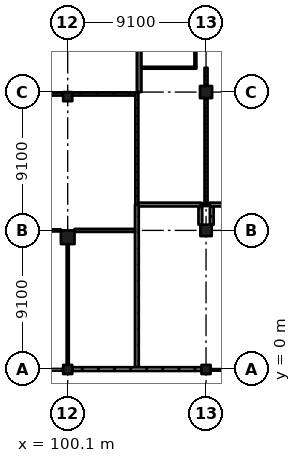
"""IFC4 building model, lengths in metres.
Left out: names, types, materials, properties, quantities, classifications, styles, units other than length and angle.
Written with IfcOpenShell. Run it as: python <this file> out.ifc"""

import sys

from ifc_helpers import new_model, si_unit, direction, frame, frame_2d, origin, origin_2d, place, context, subcontext, project, spatial, rectangle, extrude, element, fill, save


model = new_model("IFC4")
c1 = context("Model", 3, precision=1e-05, world=origin(), true_north=direction((0.0, 1.0)))
c2 = subcontext(c1, "Body", "Model", "MODEL_VIEW")
j1 = project(units=[si_unit("LENGTHUNIT", "METRE"), si_unit("PLANEANGLEUNIT", "RADIAN")], contexts=[c1])
p1 = place(None, origin())
s1 = spatial("IfcSite", under=j1, at=p1, CompositionType="ELEMENT")
p2 = place(p1, origin())
s2 = spatial("IfcBuilding", under=s1, at=p2, CompositionType="ELEMENT")
p3 = place(p2, frame((0.0, 0.0, 10.92)))
s3 = spatial("IfcBuildingStorey", under=s2, at=p3, CompositionType="ELEMENT", Elevation=10.92)
p4 = place(p3, frame((100.1, -0.05, 0.0), z_axis=(0.0, 0.0, 1.0), x_axis=(1.0, 0.0, 0.0)))
e1 = element("IfcColumn", 1, at=p4, inside=s3, PredefinedType="COLUMN", context=c2, shape_type="SweptSolid", body=[
    extrude(rectangle(XDim=0.6, YDim=0.6, at=origin_2d()), origin(), (0.0, 0.0, 1.0), 4.55),
])
p5 = place(p3, frame((100.1, 8.65, 0.0), z_axis=(0.0, 0.0, 1.0), x_axis=(1.0, 0.0, 0.0)))
e2 = element("IfcColumn", 2, at=p5, inside=s3, PredefinedType="COLUMN", context=c2, shape_type="SweptSolid", body=[
    extrude(rectangle(XDim=0.9, YDim=0.9, at=origin_2d()), origin(), (0.0, 0.0, 1.0), 4.55),
])
for number, where, z_axis, x_axis in (
    (3, (100.1, 17.9, 0.0), (0.0, 0.0, 1.0), (1.0, 0.0, 0.0)),
    (4, (109.2, -0.05, 0.0), (0.0, 0.0, 1.0), (1.0, 0.0, 0.0)),
):
    element("IfcColumn", number, at=place(p3, frame(where, z_axis=z_axis, x_axis=x_axis)), inside=s3, PredefinedType="COLUMN", context=c2, shape_type="SweptSolid", body=[
        extrude(rectangle(XDim=0.6, YDim=0.6, at=origin_2d()), origin(), (0.0, 0.0, 1.0), 4.55),
    ])
p6 = place(p3, frame((109.2, 9.1, 0.0), z_axis=(0.0, 0.0, 1.0), x_axis=(1.0, 0.0, 0.0)))
e5 = element("IfcColumn", 5, at=p6, inside=s3, PredefinedType="COLUMN", context=c2, shape_type="SweptSolid", body=[
    extrude(rectangle(XDim=0.75, YDim=0.75, at=origin_2d()), origin(), (0.0, 0.0, 1.0), 4.55),
])
p7 = place(p3, frame((109.2, 18.2, 0.0), z_axis=(0.0, 0.0, 1.0), x_axis=(1.0, 0.0, 0.0)))
e6 = element("IfcColumn", 6, at=p7, inside=s3, PredefinedType="COLUMN", context=c2, shape_type="SweptSolid", body=[
    extrude(rectangle(XDim=0.8, YDim=0.8, at=origin_2d()), origin(), (0.0, 0.0, 1.0), 4.55),
])
p8 = place(p3, frame((104.8, 40.95, 0.0), z_axis=(0.0, 0.0, 1.0), x_axis=(0.0, -1.0, 0.0)))
e7 = element("IfcWall", 7, at=p8, inside=s3, PredefinedType="SHEAR", context=c2, shape_type="SweptSolid", body=[
    extrude(rectangle(XDim=22.75, YDim=0.3, at=frame_2d((11.375, 0.0))), origin(), (0.0, 0.0, 1.0), 4.55),
])
p9 = place(p3, frame((100.4, -0.025, 0.0), z_axis=(0.0, 0.0, 1.0), x_axis=(1.0, 0.0, 0.0)))
e8 = element("IfcWall", 8, at=p9, inside=s3, PredefinedType="SOLIDWALL", context=c2, shape_type="SweptSolid", body=[
    extrude(rectangle(XDim=8.5, YDim=0.25, at=frame_2d((4.25, 0.0))), origin(), (0.0, 0.0, 1.0), 3.5),
])
p10 = place(p3, frame((99.65, 9.1, 0.0), z_axis=(0.0, 0.0, 1.0), x_axis=(-1.0, 0.0, 0.0)))
e9 = element("IfcWall", 9, at=p10, inside=s3, PredefinedType="SOLIDWALL", context=c2, shape_type="SweptSolid", body=[
    extrude(rectangle(XDim=8.2, YDim=0.14, at=frame_2d((4.1, 0.0))), origin(), (0.0, 0.0, 1.0), 3.55),
])
p11 = place(p10, frame((3.35, 0.0, 0.0)))
e10 = element("IfcOpeningElement", 10, at=p11, cuts=e9, PredefinedType="OPENING", context=c2, shape_type="SweptSolid", body=[
    extrude(rectangle(XDim=1.5, YDim=2.1, at=frame_2d((0.75, 1.05))), frame((0.0, 0.08, 0.0), z_axis=(0.0, -1.0, 0.0), x_axis=(1.0, 0.0, 0.0)), (0.0, 0.0, 1.0), 0.16),
])
p12 = place(p3, frame((100.1, 8.2, 0.0), z_axis=(0.0, 0.0, 1.0), x_axis=(0.0, -1.0, 0.0)))
e11 = element("IfcWall", 11, at=p12, inside=s3, PredefinedType="SOLIDWALL", context=c2, shape_type="SweptSolid", body=[
    extrude(rectangle(XDim=7.95, YDim=0.14, at=frame_2d((3.975, 0.0))), origin(), (0.0, 0.0, 1.0), 3.55),
])
p13 = place(p3, frame((104.525, 9.1, 0.0), z_axis=(0.0, 0.0, 1.0), x_axis=(-1.0, 0.0, 0.0)))
e12 = element("IfcWall", 12, at=p13, inside=s3, PredefinedType="PARTITIONING", context=c2, shape_type="SweptSolid", body=[
    extrude(rectangle(XDim=3.975, YDim=0.2, at=frame_2d((1.987, 0.0))), origin(), (0.0, 0.0, 1.0), 3.55),
])
p14 = place(p13, frame((1.45, 0.0, 0.0)))
e13 = element("IfcOpeningElement", 13, at=p14, cuts=e12, PredefinedType="OPENING", context=c2, shape_type="SweptSolid", body=[
    extrude(rectangle(XDim=1.0, YDim=2.1, at=frame_2d((0.5, 1.05))), frame((0.0, 0.11, 0.0), z_axis=(0.0, -1.0, 0.0), x_axis=(1.0, 0.0, 0.0)), (0.0, 0.0, 1.0), 0.22),
])
p15 = place(p3, frame((104.65, 0.1, 0.0), z_axis=(0.0, 0.0, 1.0), x_axis=(0.0, 1.0, 0.0)))
e14 = element("IfcWall", 14, at=p15, inside=s3, PredefinedType="SOLIDWALL", context=c2, shape_type="SweptSolid", body=[
    extrude(rectangle(XDim=10.7, YDim=0.25, at=frame_2d((5.35, 0.0))), origin(), (0.0, 0.0, 1.0), 4.25),
])
p16 = place(p3, frame((104.65, 10.8, 0.0), z_axis=(0.0, 0.0, 1.0), x_axis=(0.0, 1.0, 0.0)))
e15 = element("IfcWall", 15, at=p16, inside=s3, PredefinedType="PARTITIONING", context=c2, shape_type="SweptSolid", body=[
    extrude(rectangle(XDim=7.37, YDim=0.2, at=frame_2d((3.685, 0.0))), origin(), (0.0, 0.0, 1.0), 4.25),
])
p17 = place(p16, frame((0.95, 0.0, 0.0)))
e16 = element("IfcOpeningElement", 16, at=p17, cuts=e15, PredefinedType="OPENING", context=c2, shape_type="SweptSolid", body=[
    extrude(rectangle(XDim=1.8, YDim=2.4, at=frame_2d((0.9, 1.2))), frame((0.0, 0.11, 0.0), z_axis=(0.0, -1.0, 0.0), x_axis=(1.0, 0.0, 0.0)), (0.0, 0.0, 1.0), 0.22),
])
p18 = place(p16, frame((4.65, 0.0, 0.0)))
e17 = element("IfcOpeningElement", 17, at=p18, cuts=e15, PredefinedType="OPENING", context=c2, shape_type="SweptSolid", body=[
    extrude(rectangle(XDim=1.8, YDim=2.4, at=frame_2d((0.9, 1.2))), frame((0.0, 0.11, 0.0), z_axis=(0.0, -1.0, 0.0), x_axis=(1.0, 0.0, 0.0)), (0.0, 0.0, 1.0), 0.22),
])
p19 = place(p3, frame((104.95, 19.8, 0.0), z_axis=(0.0, 0.0, 1.0), x_axis=(1.0, 0.0, 0.0)))
e18 = element("IfcWall", 18, at=p19, inside=s3, PredefinedType="PARTITIONING", context=c2, shape_type="SweptSolid", body=[
    extrude(rectangle(XDim=3.613, YDim=0.125, at=frame_2d((1.806, 0.0))), origin(), (0.0, 0.0, 1.0), 4.25),
])
p20 = place(p19, frame((1.35, 0.0, 0.0)))
e19 = element("IfcOpeningElement", 19, at=p20, cuts=e18, PredefinedType="OPENING", context=c2, shape_type="SweptSolid", body=[
    extrude(rectangle(XDim=0.9, YDim=2.1, at=frame_2d((0.45, 1.05))), frame((0.0, 0.073, 0.0), z_axis=(0.0, -1.0, 0.0), x_axis=(1.0, 0.0, 0.0)), (0.0, 0.0, 1.0), 0.145),
])
p21 = place(p3, frame((108.5, 19.863, 0.0), z_axis=(0.0, 0.0, 1.0), x_axis=(0.0, 1.0, 0.0)))
e20 = element("IfcWall", 20, at=p21, inside=s3, PredefinedType="PARTITIONING", context=c2, shape_type="SweptSolid", body=[
    extrude(rectangle(XDim=7.0, YDim=0.125, at=frame_2d((3.5, 0.0))), origin(), (0.0, 0.0, 1.0), 4.25),
])
p22 = place(p3, frame((108.825, 9.475, 0.0), z_axis=(0.0, 0.0, 1.0), x_axis=(0.0, 1.0, 0.0)))
e21 = element("IfcWall", 21, at=p22, inside=s3, PredefinedType="SOLIDWALL", context=c2, shape_type="SweptSolid", body=[
    extrude(rectangle(XDim=1.2, YDim=0.25, at=frame_2d((0.6, 0.0))), origin(), (0.0, 0.0, 1.0), 4.25),
])
p23 = place(p3, frame((108.825, 10.8, 0.0), z_axis=(0.0, 0.0, 1.0), x_axis=(-1.0, 0.0, 0.0)))
e22 = element("IfcWall", 22, at=p23, inside=s3, PredefinedType="SOLIDWALL", context=c2, shape_type="SweptSolid", body=[
    extrude(rectangle(XDim=4.05, YDim=0.25, at=frame_2d((2.025, 0.0))), origin(), (0.0, 0.0, 1.0), 4.25),
])
p24 = place(p23, frame((1.15, 0.0, 0.0)))
e23 = element("IfcOpeningElement", 23, at=p24, cuts=e22, PredefinedType="OPENING", context=c2, shape_type="SweptSolid", body=[
    extrude(rectangle(XDim=1.8, YDim=2.1, at=frame_2d((0.9, 1.05))), frame((0.0, 0.135, 0.0), z_axis=(0.0, -1.0, 0.0), x_axis=(1.0, 0.0, 0.0)), (0.0, 0.0, 1.0), 0.27),
])
p25 = place(p3, frame((108.825, 10.8, 0.0), z_axis=(0.0, 0.0, 1.0), x_axis=(1.0, 0.0, 0.0)))
e24 = element("IfcWall", 24, at=p25, inside=s3, PredefinedType="PARTITIONING", context=c2, shape_type="SweptSolid", body=[
    extrude(rectangle(XDim=0.475, YDim=0.2, at=frame_2d((0.238, 0.0))), origin(), (0.0, 0.0, 1.0), 4.25),
])
p26 = place(p3, frame((109.2, 10.9, 0.0), z_axis=(0.0, 0.0, 1.0), x_axis=(0.0, 1.0, 0.0)))
e25 = element("IfcWall", 25, at=p26, inside=s3, PredefinedType="PARTITIONING", context=c2, shape_type="SweptSolid", body=[
    extrude(rectangle(XDim=6.9, YDim=0.2, at=frame_2d((3.45, 0.0))), origin(), (0.0, 0.0, 1.0), 3.55),
])
p27 = place(p26, frame((0.85, 0.0, 0.0)))
e26 = element("IfcOpeningElement", 26, at=p27, cuts=e25, PredefinedType="OPENING", context=c2, shape_type="SweptSolid", body=[
    extrude(rectangle(XDim=1.8, YDim=2.4, at=frame_2d((0.9, 1.2))), frame((0.0, 0.11, 0.0), z_axis=(0.0, -1.0, 0.0), x_axis=(1.0, 0.0, 0.0)), (0.0, 0.0, 1.0), 0.22),
])
p28 = place(p26, frame((4.25, 0.0, 0.0)))
e27 = element("IfcOpeningElement", 27, at=p28, cuts=e25, PredefinedType="OPENING", context=c2, shape_type="SweptSolid", body=[
    extrude(rectangle(XDim=1.8, YDim=2.4, at=frame_2d((0.9, 1.2))), frame((0.0, 0.11, 0.0), z_axis=(0.0, -1.0, 0.0), x_axis=(1.0, 0.0, 0.0)), (0.0, 0.0, 1.0), 0.22),
])
p29 = place(p3, frame((109.2, 18.6, 0.0), z_axis=(0.0, 0.0, 1.0), x_axis=(0.0, 1.0, 0.0)))
e28 = element("IfcWall", 28, at=p29, inside=s3, PredefinedType="PARTITIONING", context=c2, shape_type="SweptSolid", body=[
    extrude(rectangle(XDim=1.2, YDim=0.2, at=frame_2d((0.6, 0.0))), origin(), (0.0, 0.0, 1.0), 3.55),
])
p30 = place(p3, frame((109.575, 10.675, 0.0), z_axis=(0.0, 0.0, 1.0), x_axis=(0.0, -1.0, 0.0)))
e29 = element("IfcWall", 29, at=p30, inside=s3, PredefinedType="SOLIDWALL", context=c2, shape_type="SweptSolid", body=[
    extrude(rectangle(XDim=1.2, YDim=0.25, at=frame_2d((0.6, 0.0))), origin(), (0.0, 0.0, 1.0), 4.25),
])
p31 = place(p3, frame((112.17, 10.8, 0.0), z_axis=(0.0, 0.0, 1.0), x_axis=(-1.0, 0.0, 0.0)))
e30 = element("IfcWall", 30, at=p31, inside=s3, PredefinedType="SOLIDWALL", context=c2, shape_type="SweptSolid", body=[
    extrude(rectangle(XDim=2.72, YDim=0.25, at=frame_2d((1.36, 0.0))), origin(), (0.0, 0.0, 1.0), 4.25),
])
p32 = place(p3, frame((91.3, 18.07, 0.0), z_axis=(0.0, 0.0, 1.0), x_axis=(1.0, 0.0, 0.0)))
e31 = element("IfcWall", 31, at=p32, inside=s3, PredefinedType="PARTITIONING", context=c2, shape_type="SweptSolid", body=[
    extrude(rectangle(XDim=8.5, YDim=0.2, at=frame_2d((4.25, 0.0))), origin(), (0.0, 0.0, 1.0), 3.5),
])
p33 = place(p32, frame((1.25, 0.0, 1.1)))
e32 = element("IfcOpeningElement", 32, at=p33, cuts=e31, PredefinedType="OPENING", context=c2, shape_type="SweptSolid", body=[
    extrude(rectangle(XDim=6.0, YDim=2.0, at=frame_2d((3.0, 1.0))), frame((0.0, 0.11, 0.0), z_axis=(0.0, -1.0, 0.0), x_axis=(1.0, 0.0, 0.0)), (0.0, 0.0, 1.0), 0.22),
])
p34 = place(p3, frame((100.4, 18.07, 0.0), z_axis=(0.0, 0.0, 1.0), x_axis=(1.0, 0.0, 0.0)))
e33 = element("IfcWall", 33, at=p34, inside=s3, PredefinedType="PARTITIONING", context=c2, shape_type="SweptSolid", body=[
    extrude(rectangle(XDim=4.15, YDim=0.2, at=frame_2d((2.075, 0.0))), origin(), (0.0, 0.0, 1.0), 3.55),
])
p35 = place(p34, frame((1.075, 0.0, 1.1)))
e34 = element("IfcOpeningElement", 34, at=p35, cuts=e33, PredefinedType="OPENING", context=c2, shape_type="SweptSolid", body=[
    extrude(rectangle(XDim=2.0, YDim=2.0, at=frame_2d((1.0, 1.0))), frame((0.0, 0.11, 0.0), z_axis=(0.0, -1.0, 0.0), x_axis=(1.0, 0.0, 0.0)), (0.0, 0.0, 1.0), 0.22),
])
p36 = place(p35, origin())
e35 = element("IfcWindow", 35, at=p36, inside=s3, PartitioningType="SINGLE_PANEL", PredefinedType="WINDOW", context=c2, shape_type="SweptSolid", body=[
    extrude(rectangle(XDim=2.0, YDim=2.0, at=frame_2d((1.0, 1.0))), frame((0.0, 0.03, 0.0), z_axis=(0.0, -1.0, 0.0), x_axis=(1.0, 0.0, 0.0)), (0.0, 0.0, 1.0), 0.06),
])
fill(e34, e35)
p37 = place(p20, origin())
e36 = element("IfcDoor", 36, at=p37, inside=s3, OperationType="SINGLE_SWING_RIGHT", PredefinedType="DOOR", context=c2, shape_type="SweptSolid", body=[
    extrude(rectangle(XDim=0.9, YDim=2.1, at=frame_2d((0.45, 1.05))), frame((0.0, 0.025, 0.0), z_axis=(0.0, -1.0, 0.0), x_axis=(1.0, 0.0, 0.0)), (0.0, 0.0, 1.0), 0.05),
])
fill(e19, e36)
p38 = place(p24, origin())
e37 = element("IfcDoor", 37, at=p38, inside=s3, OperationType="DOUBLE_DOOR_SINGLE_SWING", PredefinedType="DOOR", context=c2, shape_type="SweptSolid", body=[
    extrude(rectangle(XDim=1.8, YDim=2.1, at=frame_2d((0.9, 1.05))), frame((0.0, 0.025, 0.0), z_axis=(0.0, -1.0, 0.0), x_axis=(1.0, 0.0, 0.0)), (0.0, 0.0, 1.0), 0.05),
])
fill(e23, e37)
p39 = place(p14, origin())
e38 = element("IfcDoor", 38, at=p39, inside=s3, OperationType="SINGLE_SWING_RIGHT", PredefinedType="DOOR", context=c2, shape_type="SweptSolid", body=[
    extrude(rectangle(XDim=1.0, YDim=2.1, at=frame_2d((0.5, 1.05))), frame((0.0, 0.025, 0.0), z_axis=(0.0, -1.0, 0.0), x_axis=(1.0, 0.0, 0.0)), (0.0, 0.0, 1.0), 0.05),
])
fill(e13, e38)
p40 = place(p27, origin())
e39 = element("IfcDoor", 39, at=p40, inside=s3, OperationType="DOUBLE_DOOR_SINGLE_SWING", PredefinedType="DOOR", context=c2, shape_type="SweptSolid", body=[
    extrude(rectangle(XDim=1.8, YDim=2.4, at=frame_2d((0.9, 1.2))), frame((0.0, 0.025, 0.0), z_axis=(0.0, -1.0, 0.0), x_axis=(1.0, 0.0, 0.0)), (0.0, 0.0, 1.0), 0.05),
])
fill(e26, e39)
p41 = place(p28, origin())
e40 = element("IfcDoor", 40, at=p41, inside=s3, OperationType="DOUBLE_DOOR_SINGLE_SWING", PredefinedType="DOOR", context=c2, shape_type="SweptSolid", body=[
    extrude(rectangle(XDim=1.8, YDim=2.4, at=frame_2d((0.9, 1.2))), frame((0.0, 0.025, 0.0), z_axis=(0.0, -1.0, 0.0), x_axis=(1.0, 0.0, 0.0)), (0.0, 0.0, 1.0), 0.05),
])
fill(e27, e40)
p42 = place(p17, origin())
e41 = element("IfcDoor", 41, at=p42, inside=s3, OperationType="DOUBLE_DOOR_SINGLE_SWING", PredefinedType="DOOR", context=c2, shape_type="SweptSolid", body=[
    extrude(rectangle(XDim=1.8, YDim=2.4, at=frame_2d((0.9, 1.2))), frame((0.0, 0.025, 0.0), z_axis=(0.0, -1.0, 0.0), x_axis=(1.0, 0.0, 0.0)), (0.0, 0.0, 1.0), 0.05),
])
fill(e16, e41)
p43 = place(p18, origin())
e42 = element("IfcDoor", 42, at=p43, inside=s3, OperationType="DOUBLE_DOOR_SINGLE_SWING", PredefinedType="DOOR", context=c2, shape_type="SweptSolid", body=[
    extrude(rectangle(XDim=1.8, YDim=2.4, at=frame_2d((0.9, 1.2))), frame((0.0, 0.025, 0.0), z_axis=(0.0, -1.0, 0.0), x_axis=(1.0, 0.0, 0.0)), (0.0, 0.0, 1.0), 0.05),
])
fill(e17, e42)
save(model, sys.argv[1])
